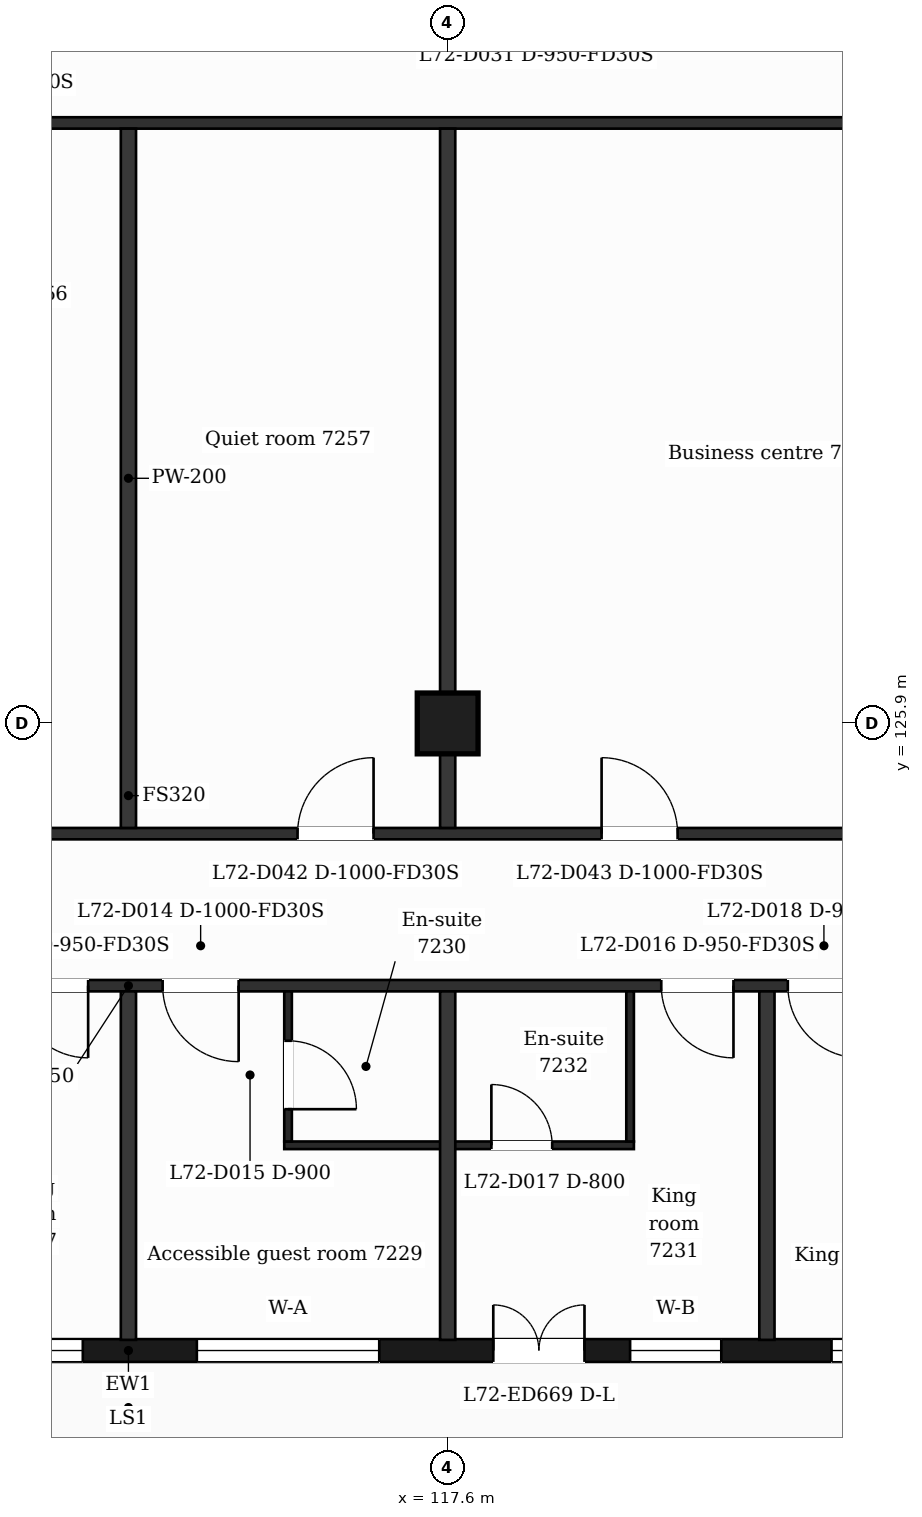
"""IFC4 building model, lengths in metres.
Left out: names, types, materials, properties, quantities, classifications, styles, units other than length and angle.
Written with IfcOpenShell. Run it as: python <this file> out.ifc"""

import sys

from ifc_helpers import new_model, si_unit, direction, frame, frame_2d, origin, origin_2d, place, context, subcontext, project, spatial, rectangle, extrude, element, fill, save


model = new_model("IFC4")
c1 = context("Model", 3, precision=1e-05, world=origin(), true_north=direction((0.0, 1.0)))
c2 = subcontext(c1, "Body", "Model", "MODEL_VIEW")
j1 = project(units=[si_unit("LENGTHUNIT", "METRE"), si_unit("PLANEANGLEUNIT", "RADIAN")], contexts=[c1])
p1 = place(None, origin())
s1 = spatial("IfcSite", under=j1, at=p1, CompositionType="ELEMENT")
p2 = place(p1, origin())
s2 = spatial("IfcBuilding", under=s1, at=p2, CompositionType="ELEMENT")
p3 = place(p2, frame((0.0, 0.0, 296.0)))
s3 = spatial("IfcBuildingStorey", under=s2, at=p3, CompositionType="ELEMENT", Elevation=296.0)
p4 = place(p3, frame((117.6, 125.9, 0.0), z_axis=(0.0, 0.0, 1.0), x_axis=(1.0, 0.0, 0.0)))
e1 = element("IfcColumn", 1, at=p4, inside=s3, PredefinedType="COLUMN", context=c2, shape_type="SweptSolid", body=[
    extrude(rectangle(XDim=0.8, YDim=0.8, at=origin_2d()), origin(), (0.0, 0.0, 1.0), 3.7),
])
p5 = place(p3, frame((100.8, 117.65, 0.0), z_axis=(0.0, 0.0, 1.0), x_axis=(1.0, 0.0, 0.0)))
e2 = element("IfcWall", 2, at=p5, inside=s3, PredefinedType="SOLIDWALL", context=c2, shape_type="SweptSolid", body=[
    extrude(rectangle(XDim=25.2, YDim=0.3, at=frame_2d((12.6, 0.0))), origin(), (0.0, 0.0, 1.0), 3.38),
])
p6 = place(p5, frame((1.55, 0.0, 0.9)))
e3 = element("IfcOpeningElement", 3, at=p6, cuts=e2, PredefinedType="OPENING", context=c2, shape_type="SweptSolid", body=[
    extrude(rectangle(XDim=1.2, YDim=2.1, at=frame_2d((0.6, 1.05))), frame((0.0, 0.16, 0.0), z_axis=(0.0, -1.0, 0.0), x_axis=(1.0, 0.0, 0.0)), (0.0, 0.0, 1.0), 0.32),
])
p7 = place(p5, frame((5.7, 0.0, 0.9)))
e4 = element("IfcOpeningElement", 4, at=p7, cuts=e2, PredefinedType="OPENING", context=c2, shape_type="SweptSolid", body=[
    extrude(rectangle(XDim=1.2, YDim=2.1, at=frame_2d((0.6, 1.05))), frame((0.0, 0.16, 0.0), z_axis=(0.0, -1.0, 0.0), x_axis=(1.0, 0.0, 0.0)), (0.0, 0.0, 1.0), 0.32),
])
p8 = place(p5, frame((9.0, 0.0, 0.0)))
e5 = element("IfcOpeningElement", 5, at=p8, cuts=e2, PredefinedType="OPENING", context=c2, shape_type="SweptSolid", body=[
    extrude(rectangle(XDim=1.2, YDim=2.4, at=frame_2d((0.6, 1.2))), frame((0.0, 0.16, 0.0), z_axis=(0.0, -1.0, 0.0), x_axis=(1.0, 0.0, 0.0)), (0.0, 0.0, 1.0), 0.32),
])
p9 = place(p5, frame((10.8, 0.0, 0.9)))
e6 = element("IfcOpeningElement", 6, at=p9, cuts=e2, PredefinedType="OPENING", context=c2, shape_type="SweptSolid", body=[
    extrude(rectangle(XDim=1.2, YDim=2.1, at=frame_2d((0.6, 1.05))), frame((0.0, 0.16, 0.0), z_axis=(0.0, -1.0, 0.0), x_axis=(1.0, 0.0, 0.0)), (0.0, 0.0, 1.0), 0.32),
])
p10 = place(p5, frame((13.5, 0.0, 0.9)))
e7 = element("IfcOpeningElement", 7, at=p10, cuts=e2, PredefinedType="OPENING", context=c2, shape_type="SweptSolid", body=[
    extrude(rectangle(XDim=2.4, YDim=2.1, at=frame_2d((1.2, 1.05))), frame((0.0, 0.16, 0.0), z_axis=(0.0, -1.0, 0.0), x_axis=(1.0, 0.0, 0.0)), (0.0, 0.0, 1.0), 0.32),
])
p11 = place(p5, frame((17.4, 0.0, 0.0)))
e8 = element("IfcOpeningElement", 8, at=p11, cuts=e2, PredefinedType="OPENING", context=c2, shape_type="SweptSolid", body=[
    extrude(rectangle(XDim=1.2, YDim=2.4, at=frame_2d((0.6, 1.2))), frame((0.0, 0.16, 0.0), z_axis=(0.0, -1.0, 0.0), x_axis=(1.0, 0.0, 0.0)), (0.0, 0.0, 1.0), 0.32),
])
p12 = place(p5, frame((19.2, 0.0, 0.9)))
e9 = element("IfcOpeningElement", 9, at=p12, cuts=e2, PredefinedType="OPENING", context=c2, shape_type="SweptSolid", body=[
    extrude(rectangle(XDim=1.2, YDim=2.1, at=frame_2d((0.6, 1.05))), frame((0.0, 0.16, 0.0), z_axis=(0.0, -1.0, 0.0), x_axis=(1.0, 0.0, 0.0)), (0.0, 0.0, 1.0), 0.32),
])
p13 = place(p5, frame((21.85, 0.0, 0.9)))
e10 = element("IfcOpeningElement", 10, at=p13, cuts=e2, PredefinedType="OPENING", context=c2, shape_type="SweptSolid", body=[
    extrude(rectangle(XDim=2.4, YDim=2.1, at=frame_2d((1.2, 1.05))), frame((0.0, 0.16, 0.0), z_axis=(0.0, -1.0, 0.0), x_axis=(1.0, 0.0, 0.0)), (0.0, 0.0, 1.0), 0.32),
])
p14 = place(p3, frame((115.45, 120.35, 0.0), z_axis=(0.0, 0.0, 1.0), x_axis=(1.0, 0.0, 0.0)))
e11 = element("IfcWall", 11, at=p14, inside=s3, PredefinedType="PARTITIONING", context=c2, shape_type="SweptSolid", body=[
    extrude(rectangle(XDim=4.6, YDim=0.1, at=frame_2d((2.3, 0.0))), origin(), (0.0, 0.0, 1.0), 3.38),
])
p15 = place(p14, frame((2.725, 0.0, 0.0)))
e12 = element("IfcOpeningElement", 12, at=p15, cuts=e11, PredefinedType="OPENING", context=c2, shape_type="SweptSolid", body=[
    extrude(rectangle(XDim=0.8, YDim=2.1, at=frame_2d((0.4, 1.05))), frame((0.0, 0.06, 0.0), z_axis=(0.0, -1.0, 0.0), x_axis=(1.0, 0.0, 0.0)), (0.0, 0.0, 1.0), 0.12),
])
p16 = place(p3, frame((100.8, 122.45, 0.0), z_axis=(0.0, 0.0, 1.0), x_axis=(1.0, 0.0, 0.0)))
e13 = element("IfcWall", 13, at=p16, inside=s3, PredefinedType="PARTITIONING", context=c2, shape_type="SweptSolid", body=[
    extrude(rectangle(XDim=25.2, YDim=0.15, at=frame_2d((12.6, 0.0))), origin(), (0.0, 0.0, 1.0), 3.38),
])
p17 = place(p16, frame((1.6, 0.0, 0.0)))
e14 = element("IfcOpeningElement", 14, at=p17, cuts=e13, PredefinedType="OPENING", context=c2, shape_type="SweptSolid", body=[
    extrude(rectangle(XDim=1.0, YDim=2.1, at=frame_2d((0.5, 1.05))), frame((0.0, 0.085, 0.0), z_axis=(0.0, -1.0, 0.0), x_axis=(1.0, 0.0, 0.0)), (0.0, 0.0, 1.0), 0.17),
])
p18 = place(p16, frame((11.12, 0.0, 0.0)))
e15 = element("IfcOpeningElement", 15, at=p18, cuts=e13, PredefinedType="OPENING", context=c2, shape_type="SweptSolid", body=[
    extrude(rectangle(XDim=0.95, YDim=2.1, at=frame_2d((0.475, 1.05))), frame((0.0, 0.085, 0.0), z_axis=(0.0, -1.0, 0.0), x_axis=(1.0, 0.0, 0.0)), (0.0, 0.0, 1.0), 0.17),
])
p19 = place(p16, frame((13.05, 0.0, 0.0)))
e16 = element("IfcOpeningElement", 16, at=p19, cuts=e13, PredefinedType="OPENING", context=c2, shape_type="SweptSolid", body=[
    extrude(rectangle(XDim=1.0, YDim=2.1, at=frame_2d((0.5, 1.05))), frame((0.0, 0.085, 0.0), z_axis=(0.0, -1.0, 0.0), x_axis=(1.0, 0.0, 0.0)), (0.0, 0.0, 1.0), 0.17),
])
p20 = place(p16, frame((19.61, 0.0, 0.0)))
e17 = element("IfcOpeningElement", 17, at=p20, cuts=e13, PredefinedType="OPENING", context=c2, shape_type="SweptSolid", body=[
    extrude(rectangle(XDim=0.95, YDim=2.1, at=frame_2d((0.475, 1.05))), frame((0.0, 0.085, 0.0), z_axis=(0.0, -1.0, 0.0), x_axis=(1.0, 0.0, 0.0)), (0.0, 0.0, 1.0), 0.17),
])
p21 = place(p16, frame((21.275, 0.0, 0.0)))
e18 = element("IfcOpeningElement", 18, at=p21, cuts=e13, PredefinedType="OPENING", context=c2, shape_type="SweptSolid", body=[
    extrude(rectangle(XDim=0.95, YDim=2.1, at=frame_2d((0.475, 1.05))), frame((0.0, 0.085, 0.0), z_axis=(0.0, -1.0, 0.0), x_axis=(1.0, 0.0, 0.0)), (0.0, 0.0, 1.0), 0.17),
])
p22 = place(p3, frame((100.8, 124.45, 0.0), z_axis=(0.0, 0.0, 1.0), x_axis=(1.0, 0.0, 0.0)))
e19 = element("IfcWall", 19, at=p22, inside=s3, PredefinedType="PARTITIONING", context=c2, shape_type="SweptSolid", body=[
    extrude(rectangle(XDim=25.2, YDim=0.15, at=frame_2d((12.6, 0.0))), origin(), (0.0, 0.0, 1.0), 3.38),
])
p23 = place(p22, frame((1.85, 0.0, 0.0)))
e20 = element("IfcOpeningElement", 20, at=p23, cuts=e19, PredefinedType="OPENING", context=c2, shape_type="SweptSolid", body=[
    extrude(rectangle(XDim=1.0, YDim=2.1, at=frame_2d((0.5, 1.05))), frame((0.0, 0.085, 0.0), z_axis=(0.0, -1.0, 0.0), x_axis=(1.0, 0.0, 0.0)), (0.0, 0.0, 1.0), 0.17),
])
p24 = place(p22, frame((6.425, 0.0, 0.0)))
e21 = element("IfcOpeningElement", 21, at=p24, cuts=e19, PredefinedType="OPENING", context=c2, shape_type="SweptSolid", body=[
    extrude(rectangle(XDim=1.0, YDim=2.1, at=frame_2d((0.5, 1.05))), frame((0.0, 0.085, 0.0), z_axis=(0.0, -1.0, 0.0), x_axis=(1.0, 0.0, 0.0)), (0.0, 0.0, 1.0), 0.17),
])
p25 = place(p22, frame((9.4, 0.0, 0.0)))
e22 = element("IfcOpeningElement", 22, at=p25, cuts=e19, PredefinedType="OPENING", context=c2, shape_type="SweptSolid", body=[
    extrude(rectangle(XDim=1.0, YDim=2.1, at=frame_2d((0.5, 1.05))), frame((0.0, 0.085, 0.0), z_axis=(0.0, -1.0, 0.0), x_axis=(1.0, 0.0, 0.0)), (0.0, 0.0, 1.0), 0.17),
])
p26 = place(p22, frame((14.825, 0.0, 0.0)))
e23 = element("IfcOpeningElement", 23, at=p26, cuts=e19, PredefinedType="OPENING", context=c2, shape_type="SweptSolid", body=[
    extrude(rectangle(XDim=1.0, YDim=2.1, at=frame_2d((0.5, 1.05))), frame((0.0, 0.085, 0.0), z_axis=(0.0, -1.0, 0.0), x_axis=(1.0, 0.0, 0.0)), (0.0, 0.0, 1.0), 0.17),
])
p27 = place(p22, frame((18.825, 0.0, 0.0)))
e24 = element("IfcOpeningElement", 24, at=p27, cuts=e19, PredefinedType="OPENING", context=c2, shape_type="SweptSolid", body=[
    extrude(rectangle(XDim=1.0, YDim=2.1, at=frame_2d((0.5, 1.05))), frame((0.0, 0.085, 0.0), z_axis=(0.0, -1.0, 0.0), x_axis=(1.0, 0.0, 0.0)), (0.0, 0.0, 1.0), 0.17),
])
p28 = place(p3, frame((100.725, 133.8, 0.0), z_axis=(0.0, 0.0, 1.0), x_axis=(1.0, 0.0, 0.0)))
e25 = element("IfcWall", 25, at=p28, inside=s3, PredefinedType="PARTITIONING", context=c2, shape_type="SweptSolid", body=[
    extrude(rectangle(XDim=25.35, YDim=0.15, at=frame_2d((12.675, 0.0))), origin(), (0.0, 0.0, 1.0), 3.38),
])
p29 = place(p28, frame((9.825, 0.0, 0.0)))
e26 = element("IfcOpeningElement", 26, at=p29, cuts=e25, PredefinedType="OPENING", context=c2, shape_type="SweptSolid", body=[
    extrude(rectangle(XDim=1.0, YDim=2.1, at=frame_2d((0.5, 1.05))), frame((0.0, 0.085, 0.0), z_axis=(0.0, -1.0, 0.0), x_axis=(1.0, 0.0, 0.0)), (0.0, 0.0, 1.0), 0.17),
])
p30 = place(p3, frame((113.4, 117.79, 0.0), z_axis=(0.0, 0.0, 1.0), x_axis=(0.0, 1.0, 0.0)))
e27 = element("IfcWall", 27, at=p30, inside=s3, PredefinedType="PARTITIONING", context=c2, shape_type="SweptSolid", body=[
    extrude(rectangle(XDim=4.585, YDim=0.2, at=frame_2d((2.292, 0.0))), origin(), (0.0, 0.0, 1.0), 3.38),
])
p31 = place(p3, frame((113.4, 124.525, 0.0), z_axis=(0.0, 0.0, 1.0), x_axis=(0.0, 1.0, 0.0)))
e28 = element("IfcWall", 28, at=p31, inside=s3, PredefinedType="PARTITIONING", context=c2, shape_type="SweptSolid", body=[
    extrude(rectangle(XDim=9.2, YDim=0.2, at=frame_2d((4.6, 0.0))), origin(), (0.0, 0.0, 1.0), 3.38),
])
p32 = place(p3, frame((115.5, 120.4, 0.0), z_axis=(0.0, 0.0, 1.0), x_axis=(0.0, 1.0, 0.0)))
e29 = element("IfcWall", 29, at=p32, inside=s3, PredefinedType="PARTITIONING", context=c2, shape_type="SweptSolid", body=[
    extrude(rectangle(XDim=1.975, YDim=0.1, at=frame_2d((0.988, 0.0))), origin(), (0.0, 0.0, 1.0), 3.38),
])
p33 = place(p32, frame((0.425, 0.0, 0.0)))
e30 = element("IfcOpeningElement", 30, at=p33, cuts=e29, PredefinedType="OPENING", context=c2, shape_type="SweptSolid", body=[
    extrude(rectangle(XDim=0.9, YDim=2.1, at=frame_2d((0.45, 1.05))), frame((0.0, 0.06, 0.0), z_axis=(0.0, -1.0, 0.0), x_axis=(1.0, 0.0, 0.0)), (0.0, 0.0, 1.0), 0.12),
])
p34 = place(p3, frame((117.6, 117.79, 0.0), z_axis=(0.0, 0.0, 1.0), x_axis=(0.0, 1.0, 0.0)))
e31 = element("IfcWall", 31, at=p34, inside=s3, PredefinedType="PARTITIONING", context=c2, shape_type="SweptSolid", body=[
    extrude(rectangle(XDim=4.585, YDim=0.2, at=frame_2d((2.292, 0.0))), origin(), (0.0, 0.0, 1.0), 3.38),
])
p35 = place(p3, frame((117.6, 124.525, 0.0), z_axis=(0.0, 0.0, 1.0), x_axis=(0.0, 1.0, 0.0)))
e32 = element("IfcWall", 32, at=p35, inside=s3, PredefinedType="PARTITIONING", context=c2, shape_type="SweptSolid", body=[
    extrude(rectangle(XDim=9.2, YDim=0.2, at=frame_2d((4.6, 0.0))), origin(), (0.0, 0.0, 1.0), 3.38),
])
p36 = place(p3, frame((120.0, 120.4, 0.0), z_axis=(0.0, 0.0, 1.0), x_axis=(0.0, 1.0, 0.0)))
e33 = element("IfcWall", 33, at=p36, inside=s3, PredefinedType="PARTITIONING", context=c2, shape_type="SweptSolid", body=[
    extrude(rectangle(XDim=1.975, YDim=0.1, at=frame_2d((0.988, 0.0))), origin(), (0.0, 0.0, 1.0), 3.38),
])
p37 = place(p3, frame((121.8, 117.79, 0.0), z_axis=(0.0, 0.0, 1.0), x_axis=(0.0, 1.0, 0.0)))
e34 = element("IfcWall", 34, at=p37, inside=s3, PredefinedType="PARTITIONING", context=c2, shape_type="SweptSolid", body=[
    extrude(rectangle(XDim=4.585, YDim=0.2, at=frame_2d((2.292, 0.0))), origin(), (0.0, 0.0, 1.0), 3.38),
])
p38 = place(p9, origin())
e35 = element("IfcWindow", 35, at=p38, inside=s3, PartitioningType="SINGLE_PANEL", PredefinedType="WINDOW", context=c2, shape_type="SweptSolid", body=[
    extrude(rectangle(XDim=1.2, YDim=2.1, at=frame_2d((0.6, 1.05))), frame((0.0, 0.03, 0.0), z_axis=(0.0, -1.0, 0.0), x_axis=(1.0, 0.0, 0.0)), (0.0, 0.0, 1.0), 0.06),
])
fill(e6, e35)
p39 = place(p10, origin())
e36 = element("IfcWindow", 36, at=p39, inside=s3, PartitioningType="SINGLE_PANEL", PredefinedType="WINDOW", context=c2, shape_type="SweptSolid", body=[
    extrude(rectangle(XDim=2.4, YDim=2.1, at=frame_2d((1.2, 1.05))), frame((0.0, 0.03, 0.0), z_axis=(0.0, -1.0, 0.0), x_axis=(1.0, 0.0, 0.0)), (0.0, 0.0, 1.0), 0.06),
])
fill(e7, e36)
p40 = place(p11, origin())
e37 = element("IfcDoor", 37, at=p40, inside=s3, OperationType="DOUBLE_DOOR_SINGLE_SWING", PredefinedType="DOOR", context=c2, shape_type="SweptSolid", body=[
    extrude(rectangle(XDim=1.2, YDim=2.4, at=frame_2d((0.6, 1.2))), frame((0.0, 0.025, 0.0), z_axis=(0.0, -1.0, 0.0), x_axis=(1.0, 0.0, 0.0)), (0.0, 0.0, 1.0), 0.05),
])
fill(e8, e37)
p41 = place(p12, origin())
e38 = element("IfcWindow", 38, at=p41, inside=s3, PartitioningType="SINGLE_PANEL", PredefinedType="WINDOW", context=c2, shape_type="SweptSolid", body=[
    extrude(rectangle(XDim=1.2, YDim=2.1, at=frame_2d((0.6, 1.05))), frame((0.0, 0.03, 0.0), z_axis=(0.0, -1.0, 0.0), x_axis=(1.0, 0.0, 0.0)), (0.0, 0.0, 1.0), 0.06),
])
fill(e9, e38)
p42 = place(p13, origin())
e39 = element("IfcWindow", 39, at=p42, inside=s3, PartitioningType="SINGLE_PANEL", PredefinedType="WINDOW", context=c2, shape_type="SweptSolid", body=[
    extrude(rectangle(XDim=2.4, YDim=2.1, at=frame_2d((1.2, 1.05))), frame((0.0, 0.03, 0.0), z_axis=(0.0, -1.0, 0.0), x_axis=(1.0, 0.0, 0.0)), (0.0, 0.0, 1.0), 0.06),
])
fill(e10, e39)
p43 = place(p18, origin())
e40 = element("IfcDoor", 40, at=p43, inside=s3, OperationType="SINGLE_SWING_RIGHT", PredefinedType="DOOR", context=c2, shape_type="SweptSolid", body=[
    extrude(rectangle(XDim=0.95, YDim=2.1, at=frame_2d((0.475, 1.05))), frame((0.0, 0.025, 0.0), z_axis=(0.0, -1.0, 0.0), x_axis=(1.0, 0.0, 0.0)), (0.0, 0.0, 1.0), 0.05),
])
fill(e15, e40)
p44 = place(p19, origin())
e41 = element("IfcDoor", 41, at=p44, inside=s3, OperationType="SINGLE_SWING_RIGHT", PredefinedType="DOOR", context=c2, shape_type="SweptSolid", body=[
    extrude(rectangle(XDim=1.0, YDim=2.1, at=frame_2d((0.5, 1.05))), frame((0.0, 0.025, 0.0), z_axis=(0.0, -1.0, 0.0), x_axis=(1.0, 0.0, 0.0)), (0.0, 0.0, 1.0), 0.05),
])
fill(e16, e41)
p45 = place(p33, origin())
e42 = element("IfcDoor", 42, at=p45, inside=s3, OperationType="SINGLE_SWING_LEFT", PredefinedType="DOOR", context=c2, shape_type="SweptSolid", body=[
    extrude(rectangle(XDim=0.9, YDim=2.1, at=frame_2d((0.45, 1.05))), frame((0.0, 0.025, 0.0), z_axis=(0.0, -1.0, 0.0), x_axis=(1.0, 0.0, 0.0)), (0.0, 0.0, 1.0), 0.05),
])
fill(e30, e42)
p46 = place(p20, origin())
e43 = element("IfcDoor", 43, at=p46, inside=s3, OperationType="SINGLE_SWING_RIGHT", PredefinedType="DOOR", context=c2, shape_type="SweptSolid", body=[
    extrude(rectangle(XDim=0.95, YDim=2.1, at=frame_2d((0.475, 1.05))), frame((0.0, 0.025, 0.0), z_axis=(0.0, -1.0, 0.0), x_axis=(1.0, 0.0, 0.0)), (0.0, 0.0, 1.0), 0.05),
])
fill(e17, e43)
p47 = place(p15, origin())
e44 = element("IfcDoor", 44, at=p47, inside=s3, OperationType="SINGLE_SWING_LEFT", PredefinedType="DOOR", context=c2, shape_type="SweptSolid", body=[
    extrude(rectangle(XDim=0.8, YDim=2.1, at=frame_2d((0.4, 1.05))), frame((0.0, 0.025, 0.0), z_axis=(0.0, -1.0, 0.0), x_axis=(1.0, 0.0, 0.0)), (0.0, 0.0, 1.0), 0.05),
])
fill(e12, e44)
p48 = place(p21, origin())
e45 = element("IfcDoor", 45, at=p48, inside=s3, OperationType="SINGLE_SWING_RIGHT", PredefinedType="DOOR", context=c2, shape_type="SweptSolid", body=[
    extrude(rectangle(XDim=0.95, YDim=2.1, at=frame_2d((0.475, 1.05))), frame((0.0, 0.025, 0.0), z_axis=(0.0, -1.0, 0.0), x_axis=(1.0, 0.0, 0.0)), (0.0, 0.0, 1.0), 0.05),
])
fill(e18, e45)
p49 = place(p26, origin())
e46 = element("IfcDoor", 46, at=p49, inside=s3, OperationType="SINGLE_SWING_RIGHT", PredefinedType="DOOR", context=c2, shape_type="SweptSolid", body=[
    extrude(rectangle(XDim=1.0, YDim=2.1, at=frame_2d((0.5, 1.05))), frame((0.0, 0.025, 0.0), z_axis=(0.0, -1.0, 0.0), x_axis=(1.0, 0.0, 0.0)), (0.0, 0.0, 1.0), 0.05),
])
fill(e23, e46)
p50 = place(p27, origin())
e47 = element("IfcDoor", 47, at=p50, inside=s3, OperationType="SINGLE_SWING_LEFT", PredefinedType="DOOR", context=c2, shape_type="SweptSolid", body=[
    extrude(rectangle(XDim=1.0, YDim=2.1, at=frame_2d((0.5, 1.05))), frame((0.0, 0.025, 0.0), z_axis=(0.0, -1.0, 0.0), x_axis=(1.0, 0.0, 0.0)), (0.0, 0.0, 1.0), 0.05),
])
fill(e24, e47)
save(model, sys.argv[1])
